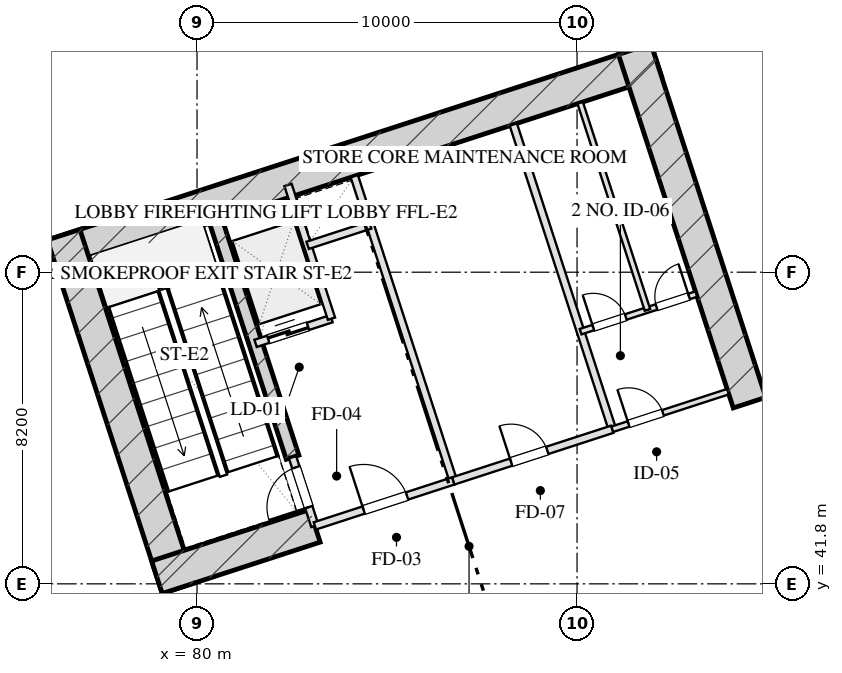
"""IFC4 building model, lengths in metres.
Left out: names, types, materials, properties, quantities, classifications, styles, units other than length and angle.
Written with IfcOpenShell. Run it as: python <this file> out.ifc"""

import sys

from ifc_helpers import new_model, si_unit, direction, frame, frame_2d, origin, place, context, subcontext, project, spatial, rectangle, extrude, element, fill, save


model = new_model("IFC4")
c1 = context("Model", 3, precision=1e-05, world=origin(), true_north=direction((0.0, 1.0)))
c2 = subcontext(c1, "Body", "Model", "MODEL_VIEW")
j1 = project(units=[si_unit("LENGTHUNIT", "METRE"), si_unit("PLANEANGLEUNIT", "RADIAN")], contexts=[c1])
p1 = place(None, origin())
s1 = spatial("IfcSite", under=j1, at=p1, CompositionType="ELEMENT")
p2 = place(p1, origin())
s2 = spatial("IfcBuilding", under=s1, at=p2, CompositionType="ELEMENT")
p3 = place(p2, frame((0.0, 0.0, -6.0)))
s3 = spatial("IfcBuildingStorey", under=s2, at=p3, CompositionType="ELEMENT", Elevation=-6.0)
p4 = place(p3, frame((76.201, 50.419, 0.0), z_axis=(0.0, 0.0, 1.0), x_axis=(0.951056412142, 0.309017314926, 0.0)))
e1 = element("IfcWall", 1, at=p4, inside=s3, PredefinedType="SHEAR", context=c2, shape_type="SweptSolid", body=[
    extrude(rectangle(XDim=16.7, YDim=0.9, at=frame_2d((8.35, 0.0))), origin(), (0.0, 0.0, 1.0), 6.0),
])
for number, where, z_axis, x_axis in (
    (2, (79.512, 41.685, 0.0), (0.0, 0.0, 1.0), (-0.309, 0.951, 0.0)),
    (3, (94.539, 46.568, 0.0), (0.0, 0.0, 1.0), (-0.309, 0.951, 0.0)),
):
    element("IfcWall", number, at=place(p3, frame(where, z_axis=z_axis, x_axis=x_axis)), inside=s3, PredefinedType="SHEAR", context=c2, shape_type="SweptSolid", body=[
        extrude(rectangle(XDim=9.78, YDim=0.9, at=frame_2d((4.89, 0.0))), origin(), (0.0, 0.0, 1.0), 6.0),
    ])
p5 = place(p3, frame((82.514, 45.131, 0.0), z_axis=(0.0, 0.0, 1.0), x_axis=(-0.308988790936, 0.951065679686, 0.0)))
e4 = element("IfcWall", 4, at=p5, inside=s3, PredefinedType="SHEAR", context=c2, shape_type="SweptSolid", body=[
    extrude(rectangle(XDim=6.98, YDim=0.35, at=frame_2d((3.49, 0.0))), origin(), (0.0, 0.0, 1.0), 6.0),
])
p6 = place(p3, frame((78.945, 41.974, 0.0), z_axis=(0.0, 0.0, 1.0), x_axis=(0.951058289404, 0.309011537255, 0.0)))
e5 = element("IfcWall", 5, at=p6, inside=s3, PredefinedType="SHEAR", context=c2, shape_type="SweptSolid", body=[
    extrude(rectangle(XDim=4.37, YDim=0.9, at=frame_2d((2.185, 0.0))), origin(), (0.0, 0.0, 1.0), 6.0),
])
p7 = place(p3, frame((83.101, 43.324, 0.0), z_axis=(0.0, 0.0, 1.0), x_axis=(-0.309048298632, 0.951046344356, 0.0)))
e6 = element("IfcWall", 6, at=p7, inside=s3, PredefinedType="PARTITIONING", context=c2, shape_type="SweptSolid", body=[
    extrude(rectangle(XDim=1.9, YDim=0.2, at=frame_2d((0.95, 0.0))), origin(), (0.0, 0.0, 1.0), 5.685),
])
p8 = place(p7, frame((0.52, 0.0, 0.0)))
e7 = element("IfcOpeningElement", 7, at=p8, cuts=e6, PredefinedType="OPENING", context=c2, shape_type="SweptSolid", body=[
    extrude(rectangle(XDim=1.1, YDim=2.05, at=frame_2d((0.55, 1.025))), frame((0.0, 0.11, 0.0), z_axis=(0.0, -1.0, 0.0), x_axis=(1.0, 0.0, 0.0)), (0.0, 0.0, 1.0), 0.22),
])
p9 = place(p3, frame((86.743, 44.508, 0.0), z_axis=(0.0, 0.0, 1.0), x_axis=(-0.309016001439, 0.951056838919, 0.0)))
e8 = element("IfcWall", 8, at=p9, inside=s3, PredefinedType="PARTITIONING", context=c2, shape_type="SweptSolid", body=[
    extrude(rectangle(XDim=8.43, YDim=0.2, at=frame_2d((4.215, 0.0))), origin(), (0.0, 0.0, 1.0), 5.685),
])
p10 = place(p3, frame((83.101, 43.324, 0.0), z_axis=(0.0, 0.0, 1.0), x_axis=(0.951052804469, 0.309028417967, 0.0)))
e9 = element("IfcWall", 9, at=p10, inside=s3, PredefinedType="PARTITIONING", context=c2, shape_type="SweptSolid", body=[
    extrude(rectangle(XDim=3.83, YDim=0.2, at=frame_2d((1.915, 0.0))), origin(), (0.0, 0.0, 1.0), 5.685),
])
p11 = place(p10, frame((1.35, 0.0, 0.0)))
e10 = element("IfcOpeningElement", 10, at=p11, cuts=e9, PredefinedType="OPENING", context=c2, shape_type="SweptSolid", body=[
    extrude(rectangle(XDim=1.2, YDim=2.05, at=frame_2d((0.6, 1.025))), frame((0.0, 0.11, 0.0), z_axis=(0.0, -1.0, 0.0), x_axis=(1.0, 0.0, 0.0)), (0.0, 0.0, 1.0), 0.22),
])
p12 = place(p3, frame((81.54, 48.127, 0.0), z_axis=(0.0, 0.0, 1.0), x_axis=(0.951062257173, 0.308999325213, 0.0)))
e11 = element("IfcWall", 11, at=p12, inside=s3, PredefinedType="PARTITIONING", context=c2, shape_type="SweptSolid", body=[
    extrude(rectangle(XDim=2.1, YDim=0.2, at=frame_2d((1.05, 0.0))), origin(), (0.0, 0.0, 1.0), 5.685),
])
p13 = place(p12, frame((0.35, 0.0, 0.0)))
e12 = element("IfcOpeningElement", 12, at=p13, cuts=e11, PredefinedType="OPENING", context=c2, shape_type="SweptSolid", body=[
    extrude(rectangle(XDim=1.1, YDim=2.05, at=frame_2d((0.55, 1.025))), frame((0.0, 0.11, 0.0), z_axis=(0.0, -1.0, 0.0), x_axis=(1.0, 0.0, 0.0)), (0.0, 0.0, 1.0), 0.22),
])
p14 = place(p3, frame((83.538, 48.776, 0.0), z_axis=(0.0, 0.0, 1.0), x_axis=(-0.3089935693, 0.951064127245, 0.0)))
e13 = element("IfcWall", 13, at=p14, inside=s3, PredefinedType="PARTITIONING", context=c2, shape_type="SweptSolid", body=[
    extrude(rectangle(XDim=3.7, YDim=0.2, at=frame_2d((1.85, 0.0))), origin(), (0.0, 0.0, 1.0), 5.685),
])
p15 = place(p3, frame((82.91, 50.707, 0.0), z_axis=(0.0, 0.0, 1.0), x_axis=(0.951041328149, 0.309063734775, 0.0)))
e14 = element("IfcWall", 14, at=p15, inside=s3, PredefinedType="PARTITIONING", context=c2, shape_type="SweptSolid", body=[
    extrude(rectangle(XDim=1.73, YDim=0.2, at=frame_2d((0.865, 0.0))), origin(), (0.0, 0.0, 1.0), 5.685),
])
p16 = place(p3, frame((90.928, 45.868, 0.0), z_axis=(0.0, 0.0, 1.0), x_axis=(-0.309042196757, 0.951048327176, 0.0)))
e15 = element("IfcWall", 15, at=p16, inside=s3, PredefinedType="PARTITIONING", context=c2, shape_type="SweptSolid", body=[
    extrude(rectangle(XDim=8.43, YDim=0.2, at=frame_2d((4.215, 0.0))), origin(), (0.0, 0.0, 1.0), 5.685),
])
p17 = place(p3, frame((86.743, 44.508, 0.0), z_axis=(0.0, 0.0, 1.0), x_axis=(0.951063829732, 0.308994485023, 0.0)))
e16 = element("IfcWall", 16, at=p17, inside=s3, PredefinedType="PARTITIONING", context=c2, shape_type="SweptSolid", body=[
    extrude(rectangle(XDim=4.4, YDim=0.2, at=frame_2d((2.2, 0.0))), origin(), (0.0, 0.0, 1.0), 5.685),
])
p18 = place(p17, frame((1.6, 0.0, 0.0)))
e17 = element("IfcOpeningElement", 17, at=p18, cuts=e16, PredefinedType="OPENING", context=c2, shape_type="SweptSolid", body=[
    extrude(rectangle(XDim=1.0, YDim=2.05, at=frame_2d((0.5, 1.025))), frame((0.0, 0.11, 0.0), z_axis=(0.0, -1.0, 0.0), x_axis=(1.0, 0.0, 0.0)), (0.0, 0.0, 1.0), 0.22),
])
p19 = place(p3, frame((90.928, 45.868, 0.0), z_axis=(0.0, 0.0, 1.0), x_axis=(0.951059297078, 0.309008435874, 0.0)))
e18 = element("IfcWall", 18, at=p19, inside=s3, PredefinedType="PARTITIONING", context=c2, shape_type="SweptSolid", body=[
    extrude(rectangle(XDim=3.2, YDim=0.15, at=frame_2d((1.6, 0.0))), origin(), (0.0, 0.0, 1.0), 5.685),
])
p20 = place(p19, frame((0.45, 0.0, 0.0)))
e19 = element("IfcOpeningElement", 19, at=p20, cuts=e18, PredefinedType="OPENING", context=c2, shape_type="SweptSolid", body=[
    extrude(rectangle(XDim=0.95, YDim=2.05, at=frame_2d((0.475, 1.025))), frame((0.0, 0.085, 0.0), z_axis=(0.0, -1.0, 0.0), x_axis=(1.0, 0.0, 0.0)), (0.0, 0.0, 1.0), 0.17),
])
p21 = place(p3, frame((90.094, 48.436, 0.0), z_axis=(0.0, 0.0, 1.0), x_axis=(0.951066581729, 0.308986014439, 0.0)))
e20 = element("IfcWall", 20, at=p21, inside=s3, PredefinedType="PARTITIONING", context=c2, shape_type="SweptSolid", body=[
    extrude(rectangle(XDim=3.2, YDim=0.15, at=frame_2d((1.6, 0.0))), origin(), (0.0, 0.0, 1.0), 5.685),
])
p22 = place(p21, frame((0.35, 0.0, 0.0)))
e21 = element("IfcOpeningElement", 21, at=p22, cuts=e20, PredefinedType="OPENING", context=c2, shape_type="SweptSolid", body=[
    extrude(rectangle(XDim=0.9, YDim=2.05, at=frame_2d((0.45, 1.025))), frame((0.0, 0.085, 0.0), z_axis=(0.0, -1.0, 0.0), x_axis=(1.0, 0.0, 0.0)), (0.0, 0.0, 1.0), 0.17),
])
p23 = place(p21, frame((2.1, 0.0, 0.0)))
e22 = element("IfcOpeningElement", 22, at=p23, cuts=e20, PredefinedType="OPENING", context=c2, shape_type="SweptSolid", body=[
    extrude(rectangle(XDim=0.9, YDim=2.05, at=frame_2d((0.45, 1.025))), frame((0.0, 0.085, 0.0), z_axis=(0.0, -1.0, 0.0), x_axis=(1.0, 0.0, 0.0)), (0.0, 0.0, 1.0), 0.17),
])
p24 = place(p3, frame((91.853, 49.007, 0.0), z_axis=(0.0, 0.0, 1.0), x_axis=(-0.309022487551, 0.951054731437, 0.0)))
e23 = element("IfcWall", 23, at=p24, inside=s3, PredefinedType="PARTITIONING", context=c2, shape_type="SweptSolid", body=[
    extrude(rectangle(XDim=5.73, YDim=0.15, at=frame_2d((2.865, 0.0))), origin(), (0.0, 0.0, 1.0), 5.685),
])
p25 = place(p8, origin())
e24 = element("IfcDoor", 24, at=p25, inside=s3, OperationType="SINGLE_SWING_LEFT", PredefinedType="DOOR", context=c2, shape_type="SweptSolid", body=[
    extrude(rectangle(XDim=1.1, YDim=2.05, at=frame_2d((0.55, 1.025))), frame((0.0, 0.025, 0.0), z_axis=(0.0, -1.0, 0.0), x_axis=(1.0, 0.0, 0.0)), (0.0, 0.0, 1.0), 0.05),
])
fill(e7, e24)
p26 = place(p11, origin())
e25 = element("IfcDoor", 25, at=p26, inside=s3, OperationType="SINGLE_SWING_LEFT", PredefinedType="DOOR", context=c2, shape_type="SweptSolid", body=[
    extrude(rectangle(XDim=1.2, YDim=2.05, at=frame_2d((0.6, 1.025))), frame((0.0, 0.025, 0.0), z_axis=(0.0, -1.0, 0.0), x_axis=(1.0, 0.0, 0.0)), (0.0, 0.0, 1.0), 0.05),
])
fill(e10, e25)
p27 = place(p13, origin())
e26 = element("IfcDoor", 26, at=p27, inside=s3, OperationType="DOUBLE_DOOR_SLIDING", PredefinedType="DOOR", context=c2, shape_type="SweptSolid", body=[
    extrude(rectangle(XDim=1.1, YDim=2.05, at=frame_2d((0.55, 1.025))), frame((0.0, 0.025, 0.0), z_axis=(0.0, -1.0, 0.0), x_axis=(1.0, 0.0, 0.0)), (0.0, 0.0, 1.0), 0.05),
])
fill(e12, e26)
p28 = place(p18, origin())
e27 = element("IfcDoor", 27, at=p28, inside=s3, OperationType="SINGLE_SWING_LEFT", PredefinedType="DOOR", context=c2, shape_type="SweptSolid", body=[
    extrude(rectangle(XDim=1.0, YDim=2.05, at=frame_2d((0.5, 1.025))), frame((0.0, 0.025, 0.0), z_axis=(0.0, -1.0, 0.0), x_axis=(1.0, 0.0, 0.0)), (0.0, 0.0, 1.0), 0.05),
])
fill(e17, e27)
p29 = place(p20, origin())
e28 = element("IfcDoor", 28, at=p29, inside=s3, OperationType="SINGLE_SWING_LEFT", PredefinedType="DOOR", context=c2, shape_type="SweptSolid", body=[
    extrude(rectangle(XDim=0.95, YDim=2.05, at=frame_2d((0.475, 1.025))), frame((0.0, 0.025, 0.0), z_axis=(0.0, -1.0, 0.0), x_axis=(1.0, 0.0, 0.0)), (0.0, 0.0, 1.0), 0.05),
])
fill(e19, e28)
p30 = place(p22, origin())
e29 = element("IfcDoor", 29, at=p30, inside=s3, OperationType="SINGLE_SWING_LEFT", PredefinedType="DOOR", context=c2, shape_type="SweptSolid", body=[
    extrude(rectangle(XDim=0.9, YDim=2.05, at=frame_2d((0.45, 1.025))), frame((0.0, 0.025, 0.0), z_axis=(0.0, -1.0, 0.0), x_axis=(1.0, 0.0, 0.0)), (0.0, 0.0, 1.0), 0.05),
])
fill(e21, e29)
p31 = place(p23, origin())
e30 = element("IfcDoor", 30, at=p31, inside=s3, OperationType="SINGLE_SWING_RIGHT", PredefinedType="DOOR", context=c2, shape_type="SweptSolid", body=[
    extrude(rectangle(XDim=0.9, YDim=2.05, at=frame_2d((0.45, 1.025))), frame((0.0, 0.025, 0.0), z_axis=(0.0, -1.0, 0.0), x_axis=(1.0, 0.0, 0.0)), (0.0, 0.0, 1.0), 0.05),
])
fill(e22, e30)
save(model, sys.argv[1])
